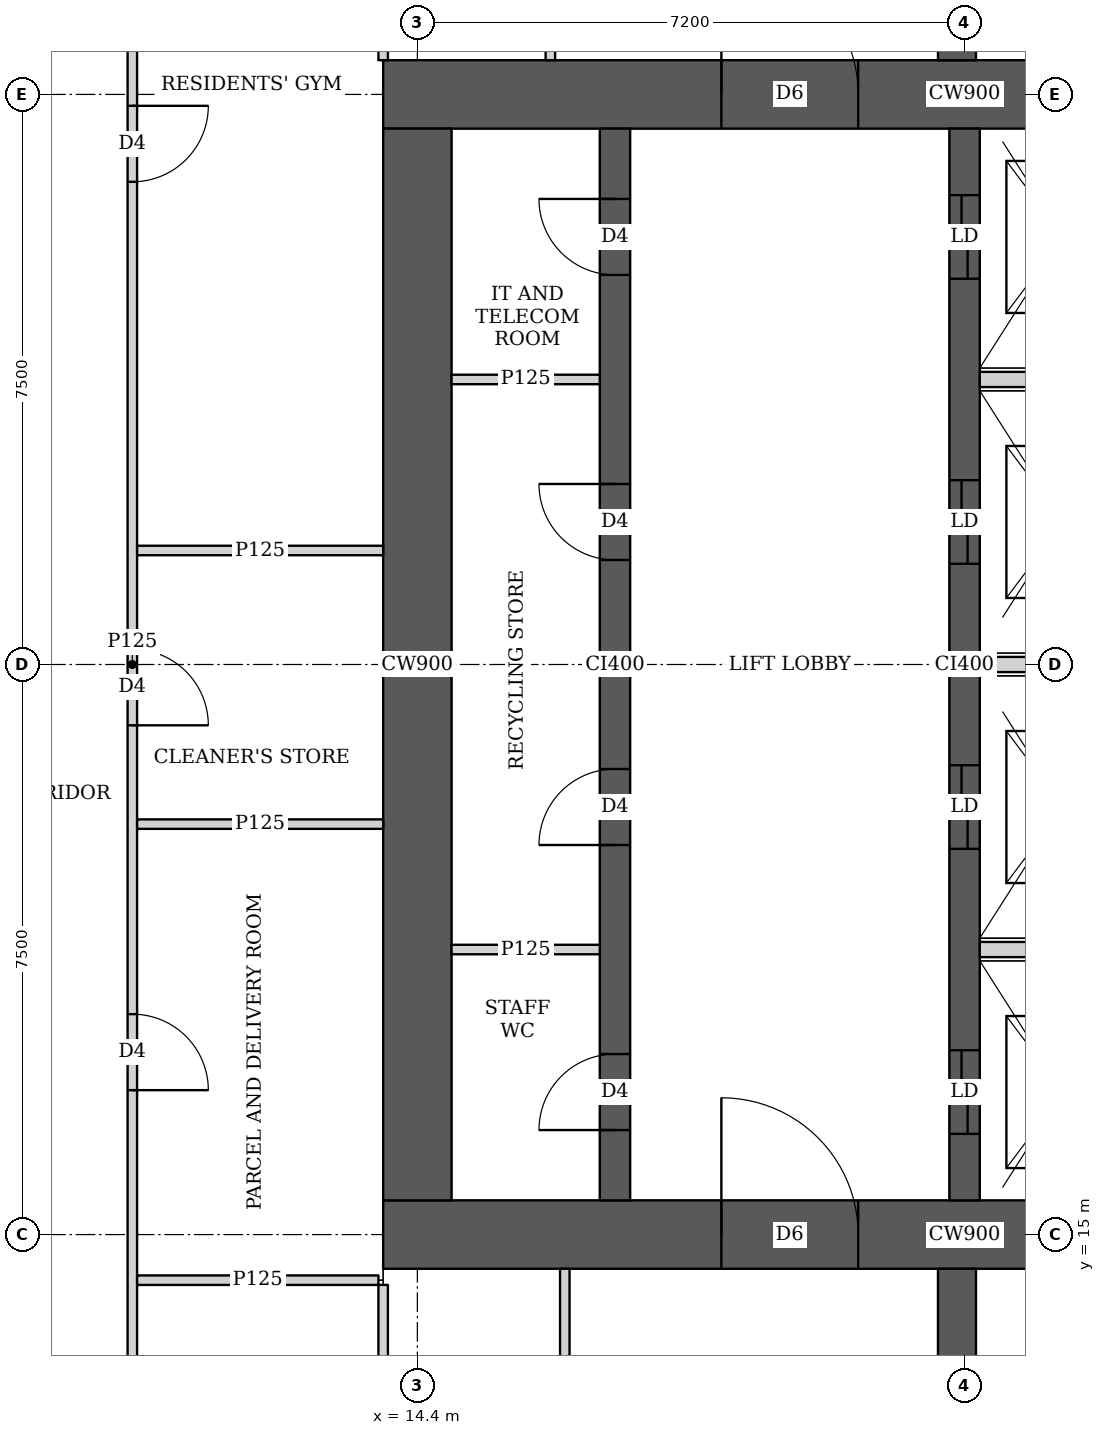
"""IFC4 building model, lengths in metres.
Left out: names, types, materials, properties, quantities, classifications, styles, units other than length and angle.
Written with IfcOpenShell. Run it as: python <this file> out.ifc"""

import sys

from ifc_helpers import new_model, si_unit, direction, frame, frame_2d, origin, place, context, subcontext, project, spatial, rectangle, extrude, element, fill, save


model = new_model("IFC4")
c1 = context("Model", 3, precision=1e-05, world=origin(), true_north=direction((0.0, 1.0)))
c2 = subcontext(c1, "Body", "Model", "MODEL_VIEW")
j1 = project(units=[si_unit("LENGTHUNIT", "METRE"), si_unit("PLANEANGLEUNIT", "RADIAN")], contexts=[c1])
p1 = place(None, origin())
s1 = spatial("IfcSite", under=j1, at=p1, CompositionType="ELEMENT")
p2 = place(p1, origin())
s2 = spatial("IfcBuilding", under=s1, at=p2, CompositionType="ELEMENT")
p3 = place(p2, frame((0.0, 0.0, 208.7)))
s3 = spatial("IfcBuildingStorey", under=s2, at=p3, CompositionType="ELEMENT", Elevation=208.7)
p4 = place(p3, frame((13.95, 15.0, 0.0), z_axis=(0.0, 0.0, 1.0), x_axis=(1.0, 0.0, 0.0)))
e1 = element("IfcWall", 1, at=p4, inside=s3, PredefinedType="SHEAR", context=c2, shape_type="SweptSolid", body=[
    extrude(rectangle(XDim=15.3, YDim=0.9, at=frame_2d((7.65, 0.0))), origin(), (0.0, 0.0, 1.0), 3.75),
])
p5 = place(p4, frame((4.45, 0.0, 0.0)))
e2 = element("IfcOpeningElement", 2, at=p5, cuts=e1, PredefinedType="OPENING", context=c2, shape_type="SweptSolid", body=[
    extrude(rectangle(XDim=1.8, YDim=2.1, at=frame_2d((0.9, 1.05))), frame((0.0, 0.46, 0.0), z_axis=(0.0, -1.0, 0.0), x_axis=(1.0, 0.0, 0.0)), (0.0, 0.0, 1.0), 0.92),
])
p6 = place(p4, frame((10.7, 0.0, 0.0)))
e3 = element("IfcOpeningElement", 3, at=p6, cuts=e1, PredefinedType="OPENING", context=c2, shape_type="SweptSolid", body=[
    extrude(rectangle(XDim=1.1, YDim=2.1, at=frame_2d((0.55, 1.05))), frame((0.0, 0.46, 0.0), z_axis=(0.0, -1.0, 0.0), x_axis=(1.0, 0.0, 0.0)), (0.0, 0.0, 1.0), 0.92),
])
p7 = place(p3, frame((13.95, 30.0, 0.0), z_axis=(0.0, 0.0, 1.0), x_axis=(1.0, 0.0, 0.0)))
e4 = element("IfcWall", 4, at=p7, inside=s3, PredefinedType="SHEAR", context=c2, shape_type="SweptSolid", body=[
    extrude(rectangle(XDim=15.3, YDim=0.9, at=frame_2d((7.65, 0.0))), origin(), (0.0, 0.0, 1.0), 3.75),
])
p8 = place(p7, frame((4.45, 0.0, 0.0)))
e5 = element("IfcOpeningElement", 5, at=p8, cuts=e4, PredefinedType="OPENING", context=c2, shape_type="SweptSolid", body=[
    extrude(rectangle(XDim=1.8, YDim=2.1, at=frame_2d((0.9, 1.05))), frame((0.0, 0.46, 0.0), z_axis=(0.0, -1.0, 0.0), x_axis=(1.0, 0.0, 0.0)), (0.0, 0.0, 1.0), 0.92),
])
p9 = place(p7, frame((10.7, 0.0, 0.0)))
e6 = element("IfcOpeningElement", 6, at=p9, cuts=e4, PredefinedType="OPENING", context=c2, shape_type="SweptSolid", body=[
    extrude(rectangle(XDim=1.1, YDim=2.1, at=frame_2d((0.55, 1.05))), frame((0.0, 0.46, 0.0), z_axis=(0.0, -1.0, 0.0), x_axis=(1.0, 0.0, 0.0)), (0.0, 0.0, 1.0), 0.92),
])
p10 = place(p3, frame((14.4, 15.45, 0.0), z_axis=(0.0, 0.0, 1.0), x_axis=(0.0, 1.0, 0.0)))
e7 = element("IfcWall", 7, at=p10, inside=s3, PredefinedType="SHEAR", context=c2, shape_type="SweptSolid", body=[
    extrude(rectangle(XDim=14.1, YDim=0.9, at=frame_2d((7.05, 0.0))), origin(), (0.0, 0.0, 1.0), 3.75),
])
p11 = place(p3, frame((17.0, 15.45, 0.0), z_axis=(0.0, 0.0, 1.0), x_axis=(0.0, 1.0, 0.0)))
e8 = element("IfcWall", 8, at=p11, inside=s3, PredefinedType="SHEAR", context=c2, shape_type="SweptSolid", body=[
    extrude(rectangle(XDim=14.1, YDim=0.4, at=frame_2d((7.05, 0.0))), origin(), (0.0, 0.0, 1.0), 3.75),
])
p12 = place(p11, frame((0.925, 0.0, 0.0)))
e9 = element("IfcOpeningElement", 9, at=p12, cuts=e8, PredefinedType="OPENING", context=c2, shape_type="SweptSolid", body=[
    extrude(rectangle(XDim=1.0, YDim=2.1, at=frame_2d((0.5, 1.05))), frame((0.0, 0.21, 0.0), z_axis=(0.0, -1.0, 0.0), x_axis=(1.0, 0.0, 0.0)), (0.0, 0.0, 1.0), 0.42),
])
p13 = place(p11, frame((4.675, 0.0, 0.0)))
e10 = element("IfcOpeningElement", 10, at=p13, cuts=e8, PredefinedType="OPENING", context=c2, shape_type="SweptSolid", body=[
    extrude(rectangle(XDim=1.0, YDim=2.1, at=frame_2d((0.5, 1.05))), frame((0.0, 0.21, 0.0), z_axis=(0.0, -1.0, 0.0), x_axis=(1.0, 0.0, 0.0)), (0.0, 0.0, 1.0), 0.42),
])
p14 = place(p11, frame((8.425, 0.0, 0.0)))
e11 = element("IfcOpeningElement", 11, at=p14, cuts=e8, PredefinedType="OPENING", context=c2, shape_type="SweptSolid", body=[
    extrude(rectangle(XDim=1.0, YDim=2.1, at=frame_2d((0.5, 1.05))), frame((0.0, 0.21, 0.0), z_axis=(0.0, -1.0, 0.0), x_axis=(1.0, 0.0, 0.0)), (0.0, 0.0, 1.0), 0.42),
])
p15 = place(p11, frame((12.175, 0.0, 0.0)))
e12 = element("IfcOpeningElement", 12, at=p15, cuts=e8, PredefinedType="OPENING", context=c2, shape_type="SweptSolid", body=[
    extrude(rectangle(XDim=1.0, YDim=2.1, at=frame_2d((0.5, 1.05))), frame((0.0, 0.21, 0.0), z_axis=(0.0, -1.0, 0.0), x_axis=(1.0, 0.0, 0.0)), (0.0, 0.0, 1.0), 0.42),
])
p16 = place(p3, frame((21.6, 15.45, 0.0), z_axis=(0.0, 0.0, 1.0), x_axis=(0.0, 1.0, 0.0)))
e13 = element("IfcWall", 13, at=p16, inside=s3, PredefinedType="SHEAR", context=c2, shape_type="SweptSolid", body=[
    extrude(rectangle(XDim=14.1, YDim=0.4, at=frame_2d((7.05, 0.0))), origin(), (0.0, 0.0, 1.0), 3.75),
])
p17 = place(p16, frame((0.875, 0.0, 0.0)))
e14 = element("IfcOpeningElement", 14, at=p17, cuts=e13, PredefinedType="OPENING", context=c2, shape_type="SweptSolid", body=[
    extrude(rectangle(XDim=1.1, YDim=2.1, at=frame_2d((0.55, 1.05))), frame((0.0, 0.21, 0.0), z_axis=(0.0, -1.0, 0.0), x_axis=(1.0, 0.0, 0.0)), (0.0, 0.0, 1.0), 0.42),
])
p18 = place(p16, frame((4.625, 0.0, 0.0)))
e15 = element("IfcOpeningElement", 15, at=p18, cuts=e13, PredefinedType="OPENING", context=c2, shape_type="SweptSolid", body=[
    extrude(rectangle(XDim=1.1, YDim=2.1, at=frame_2d((0.55, 1.05))), frame((0.0, 0.21, 0.0), z_axis=(0.0, -1.0, 0.0), x_axis=(1.0, 0.0, 0.0)), (0.0, 0.0, 1.0), 0.42),
])
p19 = place(p16, frame((8.375, 0.0, 0.0)))
e16 = element("IfcOpeningElement", 16, at=p19, cuts=e13, PredefinedType="OPENING", context=c2, shape_type="SweptSolid", body=[
    extrude(rectangle(XDim=1.1, YDim=2.1, at=frame_2d((0.55, 1.05))), frame((0.0, 0.21, 0.0), z_axis=(0.0, -1.0, 0.0), x_axis=(1.0, 0.0, 0.0)), (0.0, 0.0, 1.0), 0.42),
])
p20 = place(p16, frame((12.125, 0.0, 0.0)))
e17 = element("IfcOpeningElement", 17, at=p20, cuts=e13, PredefinedType="OPENING", context=c2, shape_type="SweptSolid", body=[
    extrude(rectangle(XDim=1.1, YDim=2.1, at=frame_2d((0.55, 1.05))), frame((0.0, 0.21, 0.0), z_axis=(0.0, -1.0, 0.0), x_axis=(1.0, 0.0, 0.0)), (0.0, 0.0, 1.0), 0.42),
])
for number, where, z_axis, x_axis in (
    (18, (21.5, 10.35, 0.0), (0.0, 0.0, 1.0), (0.0, 1.0, 0.0)),
    (19, (21.5, 30.45, 0.0), (0.0, 0.0, 1.0), (0.0, 1.0, 0.0)),
):
    element("IfcWall", number, at=place(p3, frame(where, z_axis=z_axis, x_axis=x_axis)), inside=s3, PredefinedType="SHEAR", context=c2, shape_type="SweptSolid", body=[
        extrude(rectangle(XDim=4.2, YDim=0.5, at=frame_2d((2.1, 0.0))), origin(), (0.0, 0.0, 1.0), 3.75),
    ])
p21 = place(p3, frame((10.65, 10.3, 0.0), z_axis=(0.0, 0.0, 1.0), x_axis=(0.0, 1.0, 0.0)))
e20 = element("IfcWall", 20, at=p21, inside=s3, PredefinedType="PARTITIONING", context=c2, shape_type="SweptSolid", body=[
    extrude(rectangle(XDim=24.4, YDim=0.125, at=frame_2d((12.2, 0.0))), origin(), (0.0, 0.0, 1.0), 3.5),
])
p22 = place(p21, frame((1.55, 0.0, 0.0)))
e21 = element("IfcOpeningElement", 21, at=p22, cuts=e20, PredefinedType="OPENING", context=c2, shape_type="SweptSolid", body=[
    extrude(rectangle(XDim=1.0, YDim=2.1, at=frame_2d((0.5, 1.05))), frame((0.0, 0.073, 0.0), z_axis=(0.0, -1.0, 0.0), x_axis=(1.0, 0.0, 0.0)), (0.0, 0.0, 1.0), 0.145),
])
p23 = place(p21, frame((6.6, 0.0, 0.0)))
e22 = element("IfcOpeningElement", 22, at=p23, cuts=e20, PredefinedType="OPENING", context=c2, shape_type="SweptSolid", body=[
    extrude(rectangle(XDim=1.0, YDim=2.1, at=frame_2d((0.5, 1.05))), frame((0.0, 0.073, 0.0), z_axis=(0.0, -1.0, 0.0), x_axis=(1.0, 0.0, 0.0)), (0.0, 0.0, 1.0), 0.145),
])
p24 = place(p21, frame((11.4, 0.0, 0.0)))
e23 = element("IfcOpeningElement", 23, at=p24, cuts=e20, PredefinedType="OPENING", context=c2, shape_type="SweptSolid", body=[
    extrude(rectangle(XDim=1.0, YDim=2.1, at=frame_2d((0.5, 1.05))), frame((0.0, 0.073, 0.0), z_axis=(0.0, -1.0, 0.0), x_axis=(1.0, 0.0, 0.0)), (0.0, 0.0, 1.0), 0.145),
])
p25 = place(p21, frame((18.55, 0.0, 0.0)))
e24 = element("IfcOpeningElement", 24, at=p25, cuts=e20, PredefinedType="OPENING", context=c2, shape_type="SweptSolid", body=[
    extrude(rectangle(XDim=1.0, YDim=2.1, at=frame_2d((0.5, 1.05))), frame((0.0, 0.073, 0.0), z_axis=(0.0, -1.0, 0.0), x_axis=(1.0, 0.0, 0.0)), (0.0, 0.0, 1.0), 0.145),
])
p26 = place(p3, frame((10.713, 14.4, 0.0), z_axis=(0.0, 0.0, 1.0), x_axis=(1.0, 0.0, 0.0)))
e25 = element("IfcWall", 25, at=p26, inside=s3, PredefinedType="PARTITIONING", context=c2, shape_type="SweptSolid", body=[
    extrude(rectangle(XDim=3.175, YDim=0.125, at=frame_2d((1.587, 0.0))), origin(), (0.0, 0.0, 1.0), 3.5),
])
for number, where, z_axis, x_axis in (
    (26, (10.713, 20.4, 0.0), (0.0, 0.0, 1.0), (1.0, 0.0, 0.0)),
    (27, (10.713, 24.0, 0.0), (0.0, 0.0, 1.0), (1.0, 0.0, 0.0)),
):
    element("IfcWall", number, at=place(p3, frame(where, z_axis=z_axis, x_axis=x_axis)), inside=s3, PredefinedType="PARTITIONING", context=c2, shape_type="SweptSolid", body=[
        extrude(rectangle(XDim=3.237, YDim=0.125, at=frame_2d((1.619, 0.0))), origin(), (0.0, 0.0, 1.0), 3.5),
    ])
p27 = place(p3, frame((13.95, 10.413, 0.0), z_axis=(0.0, 0.0, 1.0), x_axis=(0.0, 1.0, 0.0)))
e28 = element("IfcWall", 28, at=p27, inside=s3, PredefinedType="PARTITIONING", context=c2, shape_type="SweptSolid", body=[
    extrude(rectangle(XDim=3.925, YDim=0.125, at=frame_2d((1.962, 0.0))), origin(), (0.0, 0.0, 1.0), 3.5),
])
p28 = place(p3, frame((13.95, 30.45, 0.0), z_axis=(0.0, 0.0, 1.0), x_axis=(0.0, 1.0, 0.0)))
e29 = element("IfcWall", 29, at=p28, inside=s3, PredefinedType="PARTITIONING", context=c2, shape_type="SweptSolid", body=[
    extrude(rectangle(XDim=4.137, YDim=0.125, at=frame_2d((2.068, 0.0))), origin(), (0.0, 0.0, 1.0), 3.5),
])
p29 = place(p3, frame((16.34, 10.413, 0.0), z_axis=(0.0, 0.0, 1.0), x_axis=(0.0, 1.0, 0.0)))
e30 = element("IfcWall", 30, at=p29, inside=s3, PredefinedType="PARTITIONING", context=c2, shape_type="SweptSolid", body=[
    extrude(rectangle(XDim=4.137, YDim=0.125, at=frame_2d((2.068, 0.0))), origin(), (0.0, 0.0, 1.0), 3.5),
])
p30 = place(p29, frame((1.512, 0.0, 0.0)))
e31 = element("IfcOpeningElement", 31, at=p30, cuts=e30, PredefinedType="OPENING", context=c2, shape_type="SweptSolid", body=[
    extrude(rectangle(XDim=1.0, YDim=2.1, at=frame_2d((0.5, 1.05))), frame((0.0, 0.073, 0.0), z_axis=(0.0, -1.0, 0.0), x_axis=(1.0, 0.0, 0.0)), (0.0, 0.0, 1.0), 0.145),
])
p31 = place(p3, frame((16.15, 30.45, 0.0), z_axis=(0.0, 0.0, 1.0), x_axis=(0.0, 1.0, 0.0)))
e32 = element("IfcWall", 32, at=p31, inside=s3, PredefinedType="PARTITIONING", context=c2, shape_type="SweptSolid", body=[
    extrude(rectangle(XDim=4.137, YDim=0.125, at=frame_2d((2.068, 0.0))), origin(), (0.0, 0.0, 1.0), 3.5),
])
p32 = place(p31, frame((1.625, 0.0, 0.0)))
e33 = element("IfcOpeningElement", 33, at=p32, cuts=e32, PredefinedType="OPENING", context=c2, shape_type="SweptSolid", body=[
    extrude(rectangle(XDim=1.0, YDim=2.1, at=frame_2d((0.5, 1.05))), frame((0.0, 0.073, 0.0), z_axis=(0.0, -1.0, 0.0), x_axis=(1.0, 0.0, 0.0)), (0.0, 0.0, 1.0), 0.145),
])
for number, where, z_axis, x_axis in (
    (34, (14.85, 18.75, 0.0), (0.0, 0.0, 1.0), (1.0, 0.0, 0.0)),
    (35, (14.85, 26.25, 0.0), (0.0, 0.0, 1.0), (1.0, 0.0, 0.0)),
):
    element("IfcWall", number, at=place(p3, frame(where, z_axis=z_axis, x_axis=x_axis)), inside=s3, PredefinedType="PARTITIONING", context=c2, shape_type="SweptSolid", body=[
        extrude(rectangle(XDim=1.95, YDim=0.125, at=frame_2d((0.975, 0.0))), origin(), (0.0, 0.0, 1.0), 3.5),
    ])
for number, where, z_axis, x_axis in (
    (36, (21.8, 18.75, 0.0), (0.0, 0.0, 1.0), (1.0, 0.0, 0.0)),
    (37, (21.8, 22.5, 0.0), (0.0, 0.0, 1.0), (1.0, 0.0, 0.0)),
    (38, (21.8, 26.25, 0.0), (0.0, 0.0, 1.0), (1.0, 0.0, 0.0)),
):
    element("IfcWall", number, at=place(p3, frame(where, z_axis=z_axis, x_axis=x_axis)), inside=s3, PredefinedType="SOLIDWALL", context=c2, shape_type="SweptSolid", body=[
        extrude(rectangle(XDim=2.2, YDim=0.2, at=frame_2d((1.1, 0.0))), origin(), (0.0, 0.0, 1.0), 3.5),
    ])
p33 = place(p23, origin())
e39 = element("IfcDoor", 39, at=p33, inside=s3, OperationType="SINGLE_SWING_RIGHT", PredefinedType="DOOR", context=c2, shape_type="SweptSolid", body=[
    extrude(rectangle(XDim=1.0, YDim=2.1, at=frame_2d((0.5, 1.05))), frame((0.0, 0.025, 0.0), z_axis=(0.0, -1.0, 0.0), x_axis=(1.0, 0.0, 0.0)), (0.0, 0.0, 1.0), 0.05),
])
fill(e22, e39)
p34 = place(p24, origin())
e40 = element("IfcDoor", 40, at=p34, inside=s3, OperationType="SINGLE_SWING_RIGHT", PredefinedType="DOOR", context=c2, shape_type="SweptSolid", body=[
    extrude(rectangle(XDim=1.0, YDim=2.1, at=frame_2d((0.5, 1.05))), frame((0.0, 0.025, 0.0), z_axis=(0.0, -1.0, 0.0), x_axis=(1.0, 0.0, 0.0)), (0.0, 0.0, 1.0), 0.05),
])
fill(e23, e40)
p35 = place(p25, origin())
e41 = element("IfcDoor", 41, at=p35, inside=s3, OperationType="SINGLE_SWING_LEFT", PredefinedType="DOOR", context=c2, shape_type="SweptSolid", body=[
    extrude(rectangle(XDim=1.0, YDim=2.1, at=frame_2d((0.5, 1.05))), frame((0.0, 0.025, 0.0), z_axis=(0.0, -1.0, 0.0), x_axis=(1.0, 0.0, 0.0)), (0.0, 0.0, 1.0), 0.05),
])
fill(e24, e41)
p36 = place(p12, origin())
e42 = element("IfcDoor", 42, at=p36, inside=s3, OperationType="SINGLE_SWING_LEFT", PredefinedType="DOOR", context=c2, shape_type="SweptSolid", body=[
    extrude(rectangle(XDim=1.0, YDim=2.1, at=frame_2d((0.5, 1.05))), frame((0.0, 0.025, 0.0), z_axis=(0.0, -1.0, 0.0), x_axis=(1.0, 0.0, 0.0)), (0.0, 0.0, 1.0), 0.05),
])
fill(e9, e42)
p37 = place(p13, origin())
e43 = element("IfcDoor", 43, at=p37, inside=s3, OperationType="SINGLE_SWING_LEFT", PredefinedType="DOOR", context=c2, shape_type="SweptSolid", body=[
    extrude(rectangle(XDim=1.0, YDim=2.1, at=frame_2d((0.5, 1.05))), frame((0.0, 0.025, 0.0), z_axis=(0.0, -1.0, 0.0), x_axis=(1.0, 0.0, 0.0)), (0.0, 0.0, 1.0), 0.05),
])
fill(e10, e43)
p38 = place(p14, origin())
e44 = element("IfcDoor", 44, at=p38, inside=s3, OperationType="SINGLE_SWING_RIGHT", PredefinedType="DOOR", context=c2, shape_type="SweptSolid", body=[
    extrude(rectangle(XDim=1.0, YDim=2.1, at=frame_2d((0.5, 1.05))), frame((0.0, 0.025, 0.0), z_axis=(0.0, -1.0, 0.0), x_axis=(1.0, 0.0, 0.0)), (0.0, 0.0, 1.0), 0.05),
])
fill(e11, e44)
p39 = place(p15, origin())
e45 = element("IfcDoor", 45, at=p39, inside=s3, OperationType="SINGLE_SWING_RIGHT", PredefinedType="DOOR", context=c2, shape_type="SweptSolid", body=[
    extrude(rectangle(XDim=1.0, YDim=2.1, at=frame_2d((0.5, 1.05))), frame((0.0, 0.025, 0.0), z_axis=(0.0, -1.0, 0.0), x_axis=(1.0, 0.0, 0.0)), (0.0, 0.0, 1.0), 0.05),
])
fill(e12, e45)
p40 = place(p5, origin())
e46 = element("IfcDoor", 46, at=p40, inside=s3, OperationType="DOUBLE_DOOR_SINGLE_SWING", PredefinedType="DOOR", context=c2, shape_type="SweptSolid", body=[
    extrude(rectangle(XDim=1.8, YDim=2.1, at=frame_2d((0.9, 1.05))), frame((0.0, 0.025, 0.0), z_axis=(0.0, -1.0, 0.0), x_axis=(1.0, 0.0, 0.0)), (0.0, 0.0, 1.0), 0.05),
])
fill(e2, e46)
p41 = place(p8, origin())
e47 = element("IfcDoor", 47, at=p41, inside=s3, OperationType="DOUBLE_DOOR_SINGLE_SWING", PredefinedType="DOOR", context=c2, shape_type="SweptSolid", body=[
    extrude(rectangle(XDim=1.8, YDim=2.1, at=frame_2d((0.9, 1.05))), frame((0.0, 0.025, 0.0), z_axis=(0.0, -1.0, 0.0), x_axis=(1.0, 0.0, 0.0)), (0.0, 0.0, 1.0), 0.05),
])
fill(e5, e47)
p42 = place(p17, origin())
e48 = element("IfcDoor", 48, at=p42, inside=s3, OperationType="DOUBLE_DOOR_SLIDING", PredefinedType="DOOR", context=c2, shape_type="SweptSolid", body=[
    extrude(rectangle(XDim=1.1, YDim=2.1, at=frame_2d((0.55, 1.05))), frame((0.0, 0.025, 0.0), z_axis=(0.0, -1.0, 0.0), x_axis=(1.0, 0.0, 0.0)), (0.0, 0.0, 1.0), 0.05),
])
fill(e14, e48)
p43 = place(p18, origin())
e49 = element("IfcDoor", 49, at=p43, inside=s3, OperationType="DOUBLE_DOOR_SLIDING", PredefinedType="DOOR", context=c2, shape_type="SweptSolid", body=[
    extrude(rectangle(XDim=1.1, YDim=2.1, at=frame_2d((0.55, 1.05))), frame((0.0, 0.025, 0.0), z_axis=(0.0, -1.0, 0.0), x_axis=(1.0, 0.0, 0.0)), (0.0, 0.0, 1.0), 0.05),
])
fill(e15, e49)
p44 = place(p19, origin())
e50 = element("IfcDoor", 50, at=p44, inside=s3, OperationType="DOUBLE_DOOR_SLIDING", PredefinedType="DOOR", context=c2, shape_type="SweptSolid", body=[
    extrude(rectangle(XDim=1.1, YDim=2.1, at=frame_2d((0.55, 1.05))), frame((0.0, 0.025, 0.0), z_axis=(0.0, -1.0, 0.0), x_axis=(1.0, 0.0, 0.0)), (0.0, 0.0, 1.0), 0.05),
])
fill(e16, e50)
p45 = place(p20, origin())
e51 = element("IfcDoor", 51, at=p45, inside=s3, OperationType="DOUBLE_DOOR_SLIDING", PredefinedType="DOOR", context=c2, shape_type="SweptSolid", body=[
    extrude(rectangle(XDim=1.1, YDim=2.1, at=frame_2d((0.55, 1.05))), frame((0.0, 0.025, 0.0), z_axis=(0.0, -1.0, 0.0), x_axis=(1.0, 0.0, 0.0)), (0.0, 0.0, 1.0), 0.05),
])
fill(e17, e51)
save(model, sys.argv[1])
